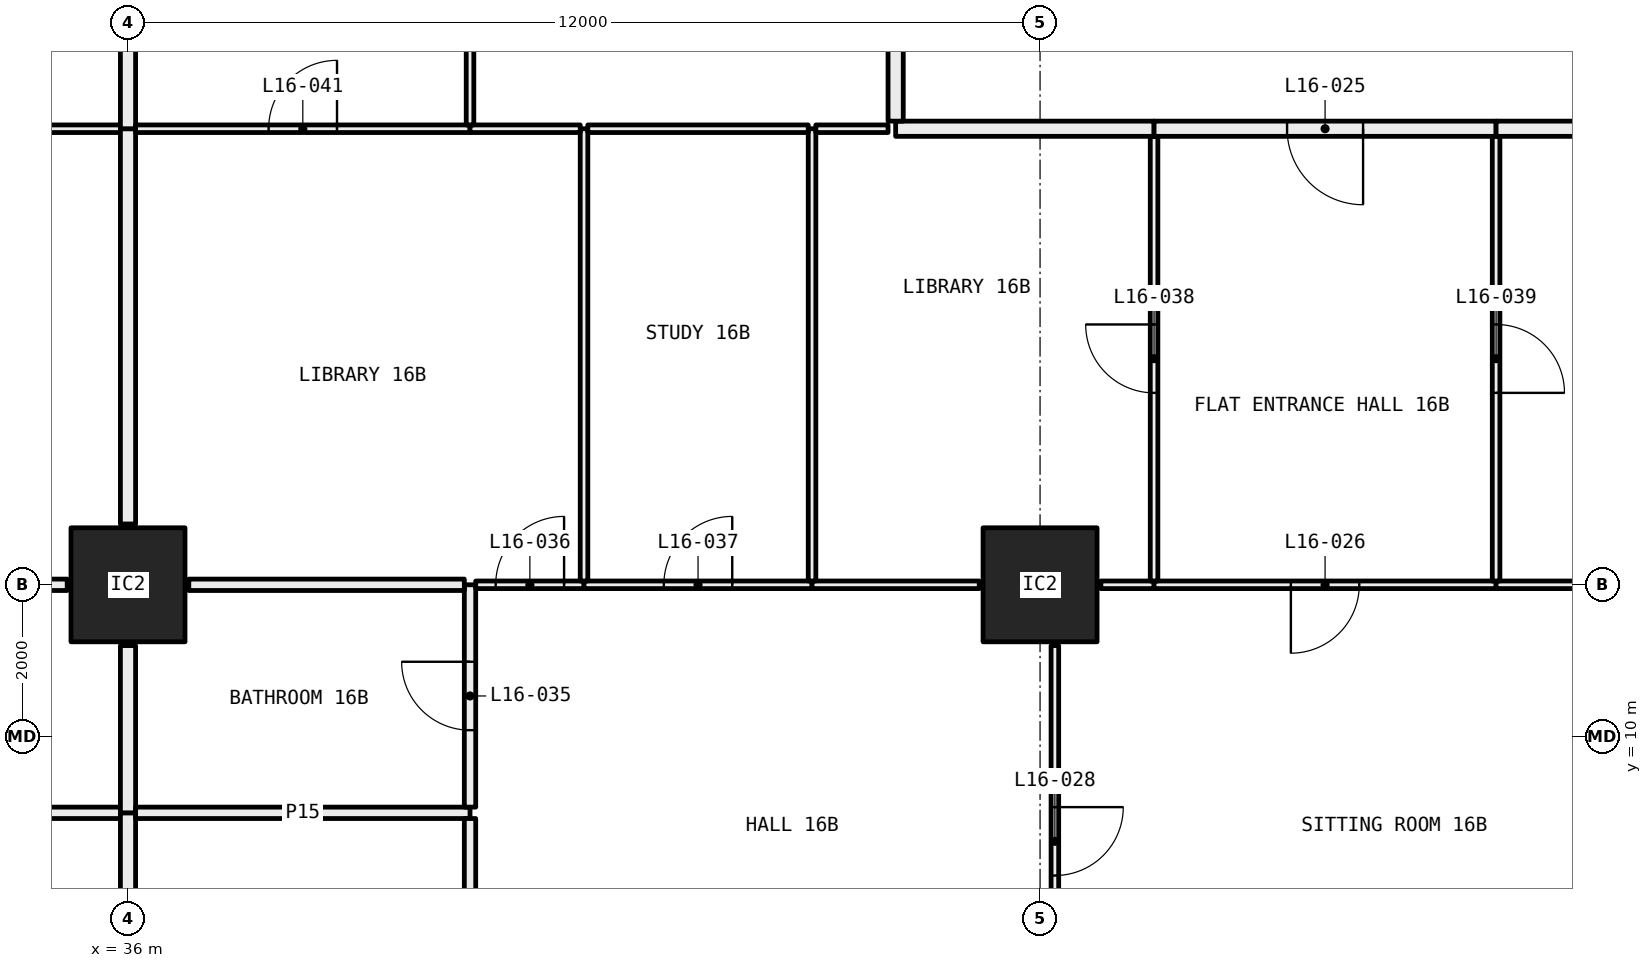
"""IFC4 building model, lengths in metres.
Left out: names, types, materials, properties, quantities, classifications, styles, units other than length and angle.
Written with IfcOpenShell. Run it as: python <this file> out.ifc"""

import sys

from ifc_helpers import new_model, si_unit, direction, frame, frame_2d, origin, origin_2d, place, context, subcontext, project, spatial, rectangle, hollow_rectangle, extrude, element, fill, save


model = new_model("IFC4")
c1 = context("Model", 3, precision=1e-05, world=origin(), true_north=direction((0.0, 1.0)))
c2 = subcontext(c1, "Body", "Model", "MODEL_VIEW")
j1 = project(units=[si_unit("LENGTHUNIT", "METRE"), si_unit("PLANEANGLEUNIT", "RADIAN")], contexts=[c1])
p1 = place(None, origin())
s1 = spatial("IfcSite", under=j1, at=p1, CompositionType="ELEMENT")
p2 = place(p1, origin())
s2 = spatial("IfcBuilding", under=s1, at=p2, CompositionType="ELEMENT")
p3 = place(p2, frame((0.0, 0.0, 67.95)))
s3 = spatial("IfcBuildingStorey", under=s2, at=p3, CompositionType="ELEMENT", Elevation=67.95)
for number, where, z_axis, x_axis in (
    (1, (36.0, 12.0, 0.0), (0.0, 0.0, 1.0), (1.0, 0.0, 0.0)),
    (2, (48.0, 12.0, 0.0), (0.0, 0.0, 1.0), (1.0, 0.0, 0.0)),
):
    element("IfcColumn", number, at=place(p3, frame(where, z_axis=z_axis, x_axis=x_axis)), inside=s3, PredefinedType="COLUMN", context=c2, shape_type="SweptSolid", body=[
        extrude(hollow_rectangle(XDim=1.5, YDim=1.5, WallThickness=0.065, at=origin_2d()), origin(), (0.0, 0.0, 1.0), 3.05),
    ])
p4 = place(p3, frame((35.9, 9.0, 0.0), z_axis=(0.0, 0.0, 1.0), x_axis=(-1.0, 0.0, 0.0)))
e3 = element("IfcWall", 3, at=p4, inside=s3, PredefinedType="PARTITIONING", context=c2, shape_type="SweptSolid", body=[
    extrude(rectangle(XDim=4.325, YDim=0.15, at=frame_2d((2.163, 0.0))), origin(), (0.0, 0.0, 1.0), 3.05),
])
p5 = place(p3, frame((36.0, 6.0, 0.0), z_axis=(0.0, 0.0, 1.0), x_axis=(0.0, 1.0, 0.0)))
e4 = element("IfcWall", 4, at=p5, inside=s3, PredefinedType="PARTITIONING", context=c2, shape_type="SweptSolid", body=[
    extrude(rectangle(XDim=3.0, YDim=0.2, at=frame_2d((1.5, 0.0))), origin(), (0.0, 0.0, 1.0), 2.45),
])
p6 = place(p3, frame((35.2, 12.0, 0.0), z_axis=(0.0, 0.0, 1.0), x_axis=(-1.0, 0.0, 0.0)))
e5 = element("IfcWall", 5, at=p6, inside=s3, PredefinedType="PARTITIONING", context=c2, shape_type="SweptSolid", body=[
    extrude(rectangle(XDim=3.625, YDim=0.15, at=frame_2d((1.812, 0.0))), origin(), (0.0, 0.0, 1.0), 2.45),
])
p7 = place(p3, frame((36.0, 9.0, 0.0), z_axis=(0.0, 0.0, 1.0), x_axis=(0.0, 1.0, 0.0)))
e6 = element("IfcWall", 6, at=p7, inside=s3, PredefinedType="PARTITIONING", context=c2, shape_type="SweptSolid", body=[
    extrude(rectangle(XDim=2.2, YDim=0.2, at=frame_2d((1.1, 0.0))), origin(), (0.0, 0.0, 1.0), 2.45),
])
p8 = place(p3, frame((35.9, 18.0, 0.0), z_axis=(0.0, 0.0, 1.0), x_axis=(-1.0, 0.0, 0.0)))
e7 = element("IfcWall", 7, at=p8, inside=s3, PredefinedType="PARTITIONING", context=c2, shape_type="SweptSolid", body=[
    extrude(rectangle(XDim=4.4, YDim=0.1, at=frame_2d((2.2, 0.0))), origin(), (0.0, 0.0, 1.0), 3.05),
])
for number, where, z_axis, x_axis in (
    (8, (36.0, 12.8, 0.0), (0.0, 0.0, 1.0), (0.0, 1.0, 0.0)),
    (9, (36.0, 18.0, 0.0), (0.0, 0.0, 1.0), (0.0, 1.0, 0.0)),
):
    element("IfcWall", number, at=place(p3, frame(where, z_axis=z_axis, x_axis=x_axis)), inside=s3, PredefinedType="PARTITIONING", context=c2, shape_type="SweptSolid", body=[
        extrude(rectangle(XDim=5.2, YDim=0.2, at=frame_2d((2.6, 0.0))), origin(), (0.0, 0.0, 1.0), 2.45),
    ])
p9 = place(p3, frame((40.5, 9.0, 0.0), z_axis=(0.0, 0.0, 1.0), x_axis=(-1.0, 0.0, 0.0)))
e10 = element("IfcWall", 10, at=p9, inside=s3, PredefinedType="PARTITIONING", context=c2, shape_type="SweptSolid", body=[
    extrude(rectangle(XDim=4.4, YDim=0.15, at=frame_2d((2.2, 0.0))), origin(), (0.0, 0.0, 1.0), 3.05),
])
p10 = place(p3, frame((40.5, 6.075, 0.0), z_axis=(0.0, 0.0, 1.0), x_axis=(0.0, 1.0, 0.0)))
e11 = element("IfcWall", 11, at=p10, inside=s3, PredefinedType="PARTITIONING", context=c2, shape_type="SweptSolid", body=[
    extrude(rectangle(XDim=2.85, YDim=0.15, at=frame_2d((1.425, 0.0))), origin(), (0.0, 0.0, 1.0), 3.05),
])
p11 = place(p10, frame((0.975, 0.0, 0.0)))
e12 = element("IfcOpeningElement", 12, at=p11, cuts=e11, PredefinedType="OPENING", context=c2, shape_type="SweptSolid", body=[
    extrude(rectangle(XDim=0.9, YDim=2.1, at=frame_2d((0.45, 1.05))), frame((0.0, 0.085, 0.0), z_axis=(0.0, -1.0, 0.0), x_axis=(1.0, 0.0, 0.0)), (0.0, 0.0, 1.0), 0.17),
])
p12 = place(p3, frame((40.5, 9.075, 0.0), z_axis=(0.0, 0.0, 1.0), x_axis=(0.0, 1.0, 0.0)))
e13 = element("IfcWall", 13, at=p12, inside=s3, PredefinedType="PARTITIONING", context=c2, shape_type="SweptSolid", body=[
    extrude(rectangle(XDim=2.925, YDim=0.15, at=frame_2d((1.462, 0.0))), origin(), (0.0, 0.0, 1.0), 2.45),
])
p13 = place(p12, frame((1.012, 0.0, 0.0)))
e14 = element("IfcOpeningElement", 14, at=p13, cuts=e13, PredefinedType="OPENING", context=c2, shape_type="SweptSolid", body=[
    extrude(rectangle(XDim=0.9, YDim=2.1, at=frame_2d((0.45, 1.05))), frame((0.0, 0.085, 0.0), z_axis=(0.0, -1.0, 0.0), x_axis=(1.0, 0.0, 0.0)), (0.0, 0.0, 1.0), 0.17),
])
p14 = place(p3, frame((40.425, 12.0, 0.0), z_axis=(0.0, 0.0, 1.0), x_axis=(-1.0, 0.0, 0.0)))
e15 = element("IfcWall", 15, at=p14, inside=s3, PredefinedType="PARTITIONING", context=c2, shape_type="SweptSolid", body=[
    extrude(rectangle(XDim=3.625, YDim=0.15, at=frame_2d((1.812, 0.0))), origin(), (0.0, 0.0, 1.0), 2.45),
])
p15 = place(p3, frame((48.195, 6.05, 0.0), z_axis=(0.0, 0.0, 1.0), x_axis=(0.0, 1.0, 0.0)))
e16 = element("IfcWall", 16, at=p15, inside=s3, PredefinedType="PARTITIONING", context=c2, shape_type="SweptSolid", body=[
    extrude(rectangle(XDim=5.15, YDim=0.1, at=frame_2d((2.575, 0.0))), origin(), (0.0, 0.0, 1.0), 3.05),
])
p16 = place(p15, frame((2.125, 0.0, 0.0)))
e17 = element("IfcOpeningElement", 17, at=p16, cuts=e16, PredefinedType="OPENING", context=c2, shape_type="SweptSolid", body=[
    extrude(rectangle(XDim=0.9, YDim=2.1, at=frame_2d((0.45, 1.05))), frame((0.0, 0.06, 0.0), z_axis=(0.0, -1.0, 0.0), x_axis=(1.0, 0.0, 0.0)), (0.0, 0.0, 1.0), 0.12),
])
p17 = place(p3, frame((42.0, 12.0, 0.0), z_axis=(0.0, 0.0, 1.0), x_axis=(-1.0, 0.0, 0.0)))
e18 = element("IfcWall", 18, at=p17, inside=s3, PredefinedType="PARTITIONING", context=c2, shape_type="SweptSolid", body=[
    extrude(rectangle(XDim=1.425, YDim=0.1, at=frame_2d((0.712, 0.0))), origin(), (0.0, 0.0, 1.0), 2.45),
])
p18 = place(p17, frame((0.262, 0.0, 0.0)))
e19 = element("IfcOpeningElement", 19, at=p18, cuts=e18, PredefinedType="OPENING", context=c2, shape_type="SweptSolid", body=[
    extrude(rectangle(XDim=0.9, YDim=2.1, at=frame_2d((0.45, 1.05))), frame((0.0, 0.06, 0.0), z_axis=(0.0, -1.0, 0.0), x_axis=(1.0, 0.0, 0.0)), (0.0, 0.0, 1.0), 0.12),
])
p19 = place(p3, frame((45.0, 12.0, 0.0), z_axis=(0.0, 0.0, 1.0), x_axis=(-1.0, 0.0, 0.0)))
e20 = element("IfcWall", 20, at=p19, inside=s3, PredefinedType="PARTITIONING", context=c2, shape_type="SweptSolid", body=[
    extrude(rectangle(XDim=3.0, YDim=0.1, at=frame_2d((1.5, 0.0))), origin(), (0.0, 0.0, 1.0), 2.45),
])
p20 = place(p19, frame((1.05, 0.0, 0.0)))
e21 = element("IfcOpeningElement", 21, at=p20, cuts=e20, PredefinedType="OPENING", context=c2, shape_type="SweptSolid", body=[
    extrude(rectangle(XDim=0.9, YDim=2.1, at=frame_2d((0.45, 1.05))), frame((0.0, 0.06, 0.0), z_axis=(0.0, -1.0, 0.0), x_axis=(1.0, 0.0, 0.0)), (0.0, 0.0, 1.0), 0.12),
])
p21 = place(p3, frame((47.2, 12.0, 0.0), z_axis=(0.0, 0.0, 1.0), x_axis=(-1.0, 0.0, 0.0)))
e22 = element("IfcWall", 22, at=p21, inside=s3, PredefinedType="PARTITIONING", context=c2, shape_type="SweptSolid", body=[
    extrude(rectangle(XDim=2.2, YDim=0.1, at=frame_2d((1.1, 0.0))), origin(), (0.0, 0.0, 1.0), 2.45),
])
p22 = place(p3, frame((49.5, 12.0, 0.0), z_axis=(0.0, 0.0, 1.0), x_axis=(-1.0, 0.0, 0.0)))
e23 = element("IfcWall", 23, at=p22, inside=s3, PredefinedType="PARTITIONING", context=c2, shape_type="SweptSolid", body=[
    extrude(rectangle(XDim=0.7, YDim=0.1, at=frame_2d((0.35, 0.0))), origin(), (0.0, 0.0, 1.0), 2.45),
])
p23 = place(p3, frame((54.0, 12.0, 0.0), z_axis=(0.0, 0.0, 1.0), x_axis=(-1.0, 0.0, 0.0)))
e24 = element("IfcWall", 24, at=p23, inside=s3, PredefinedType="PARTITIONING", context=c2, shape_type="SweptSolid", body=[
    extrude(rectangle(XDim=4.5, YDim=0.1, at=frame_2d((2.25, 0.0))), origin(), (0.0, 0.0, 1.0), 2.45),
])
p24 = place(p23, frame((1.8, 0.0, 0.0)))
e25 = element("IfcOpeningElement", 25, at=p24, cuts=e24, PredefinedType="OPENING", context=c2, shape_type="SweptSolid", body=[
    extrude(rectangle(XDim=0.9, YDim=2.1, at=frame_2d((0.45, 1.05))), frame((0.0, 0.06, 0.0), z_axis=(0.0, -1.0, 0.0), x_axis=(1.0, 0.0, 0.0)), (0.0, 0.0, 1.0), 0.12),
])
p25 = place(p3, frame((55.84, 12.0, 0.0), z_axis=(0.0, 0.0, 1.0), x_axis=(-1.0, 0.0, 0.0)))
e26 = element("IfcWall", 26, at=p25, inside=s3, PredefinedType="PARTITIONING", context=c2, shape_type="SweptSolid", body=[
    extrude(rectangle(XDim=1.84, YDim=0.1, at=frame_2d((0.92, 0.0))), origin(), (0.0, 0.0, 1.0), 2.45),
])
p26 = place(p3, frame((42.0, 12.05, 0.0), z_axis=(0.0, 0.0, 1.0), x_axis=(0.0, 1.0, 0.0)))
e27 = element("IfcWall", 27, at=p26, inside=s3, PredefinedType="PARTITIONING", context=c2, shape_type="SweptSolid", body=[
    extrude(rectangle(XDim=5.95, YDim=0.1, at=frame_2d((2.975, 0.0))), origin(), (0.0, 0.0, 1.0), 2.45),
])
p27 = place(p3, frame((40.5, 18.0, 0.0), z_axis=(0.0, 0.0, 1.0), x_axis=(-1.0, 0.0, 0.0)))
e28 = element("IfcWall", 28, at=p27, inside=s3, PredefinedType="PARTITIONING", context=c2, shape_type="SweptSolid", body=[
    extrude(rectangle(XDim=4.4, YDim=0.1, at=frame_2d((2.2, 0.0))), origin(), (0.0, 0.0, 1.0), 3.05),
])
p28 = place(p27, frame((1.75, 0.0, 0.0)))
e29 = element("IfcOpeningElement", 29, at=p28, cuts=e28, PredefinedType="OPENING", context=c2, shape_type="SweptSolid", body=[
    extrude(rectangle(XDim=0.9, YDim=2.1, at=frame_2d((0.45, 1.05))), frame((0.0, 0.06, 0.0), z_axis=(0.0, -1.0, 0.0), x_axis=(1.0, 0.0, 0.0)), (0.0, 0.0, 1.0), 0.12),
])
p29 = place(p3, frame((41.95, 18.0, 0.0), z_axis=(0.0, 0.0, 1.0), x_axis=(-1.0, 0.0, 0.0)))
e30 = element("IfcWall", 30, at=p29, inside=s3, PredefinedType="PARTITIONING", context=c2, shape_type="SweptSolid", body=[
    extrude(rectangle(XDim=1.45, YDim=0.1, at=frame_2d((0.725, 0.0))), origin(), (0.0, 0.0, 1.0), 3.05),
])
p30 = place(p3, frame((45.0, 12.05, 0.0), z_axis=(0.0, 0.0, 1.0), x_axis=(0.0, 1.0, 0.0)))
e31 = element("IfcWall", 31, at=p30, inside=s3, PredefinedType="PARTITIONING", context=c2, shape_type="SweptSolid", body=[
    extrude(rectangle(XDim=5.95, YDim=0.1, at=frame_2d((2.975, 0.0))), origin(), (0.0, 0.0, 1.0), 2.45),
])
p31 = place(p3, frame((44.95, 18.0, 0.0), z_axis=(0.0, 0.0, 1.0), x_axis=(-1.0, 0.0, 0.0)))
e32 = element("IfcWall", 32, at=p31, inside=s3, PredefinedType="PARTITIONING", context=c2, shape_type="SweptSolid", body=[
    extrude(rectangle(XDim=2.9, YDim=0.1, at=frame_2d((1.45, 0.0))), origin(), (0.0, 0.0, 1.0), 3.05),
])
p32 = place(p3, frame((49.5, 12.05, 0.0), z_axis=(0.0, 0.0, 1.0), x_axis=(0.0, 1.0, 0.0)))
e33 = element("IfcWall", 33, at=p32, inside=s3, PredefinedType="PARTITIONING", context=c2, shape_type="SweptSolid", body=[
    extrude(rectangle(XDim=5.85, YDim=0.1, at=frame_2d((2.925, 0.0))), origin(), (0.0, 0.0, 1.0), 2.45),
])
p33 = place(p32, frame((2.475, 0.0, 0.0)))
e34 = element("IfcOpeningElement", 34, at=p33, cuts=e33, PredefinedType="OPENING", context=c2, shape_type="SweptSolid", body=[
    extrude(rectangle(XDim=0.9, YDim=2.1, at=frame_2d((0.45, 1.05))), frame((0.0, 0.06, 0.0), z_axis=(0.0, -1.0, 0.0), x_axis=(1.0, 0.0, 0.0)), (0.0, 0.0, 1.0), 0.12),
])
p34 = place(p3, frame((46.0, 18.0, 0.0), z_axis=(0.0, 0.0, 1.0), x_axis=(-1.0, 0.0, 0.0)))
e35 = element("IfcWall", 35, at=p34, inside=s3, PredefinedType="PARTITIONING", context=c2, shape_type="SweptSolid", body=[
    extrude(rectangle(XDim=0.95, YDim=0.1, at=frame_2d((0.475, 0.0))), origin(), (0.0, 0.0, 1.0), 3.05),
])
p35 = place(p3, frame((49.5, 18.0, 0.0), z_axis=(0.0, 0.0, 1.0), x_axis=(-1.0, 0.0, 0.0)))
e36 = element("IfcWall", 36, at=p35, inside=s3, PredefinedType="PARTITIONING", context=c2, shape_type="SweptSolid", body=[
    extrude(rectangle(XDim=3.4, YDim=0.2, at=frame_2d((1.7, 0.0))), origin(), (0.0, 0.0, 1.0), 3.05),
])
p36 = place(p3, frame((54.0, 12.05, 0.0), z_axis=(0.0, 0.0, 1.0), x_axis=(0.0, 1.0, 0.0)))
e37 = element("IfcWall", 37, at=p36, inside=s3, PredefinedType="PARTITIONING", context=c2, shape_type="SweptSolid", body=[
    extrude(rectangle(XDim=5.85, YDim=0.1, at=frame_2d((2.925, 0.0))), origin(), (0.0, 0.0, 1.0), 2.45),
])
p37 = place(p36, frame((2.475, 0.0, 0.0)))
e38 = element("IfcOpeningElement", 38, at=p37, cuts=e37, PredefinedType="OPENING", context=c2, shape_type="SweptSolid", body=[
    extrude(rectangle(XDim=0.9, YDim=2.1, at=frame_2d((0.45, 1.05))), frame((0.0, 0.06, 0.0), z_axis=(0.0, -1.0, 0.0), x_axis=(1.0, 0.0, 0.0)), (0.0, 0.0, 1.0), 0.12),
])
p38 = place(p3, frame((54.0, 18.0, 0.0), z_axis=(0.0, 0.0, 1.0), x_axis=(-1.0, 0.0, 0.0)))
e39 = element("IfcWall", 39, at=p38, inside=s3, PredefinedType="PARTITIONING", context=c2, shape_type="SweptSolid", body=[
    extrude(rectangle(XDim=4.5, YDim=0.2, at=frame_2d((2.25, 0.0))), origin(), (0.0, 0.0, 1.0), 3.05),
])
p39 = place(p38, frame((1.75, 0.0, 0.0)))
e40 = element("IfcOpeningElement", 40, at=p39, cuts=e39, PredefinedType="OPENING", context=c2, shape_type="SweptSolid", body=[
    extrude(rectangle(XDim=1.0, YDim=2.1, at=frame_2d((0.5, 1.05))), frame((0.0, 0.11, 0.0), z_axis=(0.0, -1.0, 0.0), x_axis=(1.0, 0.0, 0.0)), (0.0, 0.0, 1.0), 0.22),
])
p40 = place(p3, frame((61.9, 18.0, 0.0), z_axis=(0.0, 0.0, 1.0), x_axis=(-1.0, 0.0, 0.0)))
e41 = element("IfcWall", 41, at=p40, inside=s3, PredefinedType="PARTITIONING", context=c2, shape_type="SweptSolid", body=[
    extrude(rectangle(XDim=7.9, YDim=0.2, at=frame_2d((3.95, 0.0))), origin(), (0.0, 0.0, 1.0), 3.05),
])
p41 = place(p3, frame((40.5, 18.05, 0.0), z_axis=(0.0, 0.0, 1.0), x_axis=(0.0, 1.0, 0.0)))
e42 = element("IfcWall", 42, at=p41, inside=s3, PredefinedType="PARTITIONING", context=c2, shape_type="SweptSolid", body=[
    extrude(rectangle(XDim=6.175, YDim=0.1, at=frame_2d((3.087, 0.0))), origin(), (0.0, 0.0, 1.0), 2.45),
])
p42 = place(p41, frame((2.637, 0.0, 0.0)))
e43 = element("IfcOpeningElement", 43, at=p42, cuts=e42, PredefinedType="OPENING", context=c2, shape_type="SweptSolid", body=[
    extrude(rectangle(XDim=0.9, YDim=2.1, at=frame_2d((0.45, 1.05))), frame((0.0, 0.06, 0.0), z_axis=(0.0, -1.0, 0.0), x_axis=(1.0, 0.0, 0.0)), (0.0, 0.0, 1.0), 0.12),
])
p43 = place(p3, frame((46.1, 18.1, 0.0), z_axis=(0.0, 0.0, 1.0), x_axis=(0.0, 1.0, 0.0)))
e44 = element("IfcWall", 44, at=p43, inside=s3, PredefinedType="PARTITIONING", context=c2, shape_type="SweptSolid", body=[
    extrude(rectangle(XDim=6.2, YDim=0.2, at=frame_2d((3.1, 0.0))), origin(), (0.0, 0.0, 1.0), 2.45),
])
p44 = place(p39, origin())
e45 = element("IfcDoor", 45, at=p44, inside=s3, OperationType="SINGLE_SWING_RIGHT", PredefinedType="DOOR", context=c2, shape_type="SweptSolid", body=[
    extrude(rectangle(XDim=1.0, YDim=2.1, at=frame_2d((0.5, 1.05))), frame((0.0, 0.025, 0.0), z_axis=(0.0, -1.0, 0.0), x_axis=(1.0, 0.0, 0.0)), (0.0, 0.0, 1.0), 0.05),
])
fill(e40, e45)
p45 = place(p24, origin())
e46 = element("IfcDoor", 46, at=p45, inside=s3, OperationType="SINGLE_SWING_LEFT", PredefinedType="DOOR", context=c2, shape_type="SweptSolid", body=[
    extrude(rectangle(XDim=0.9, YDim=2.1, at=frame_2d((0.45, 1.05))), frame((0.0, 0.025, 0.0), z_axis=(0.0, -1.0, 0.0), x_axis=(1.0, 0.0, 0.0)), (0.0, 0.0, 1.0), 0.05),
])
fill(e25, e46)
p46 = place(p16, frame((0.9, 0.0, 0.0), x_axis=(-1.0, 0.0, 0.0)))
e47 = element("IfcDoor", 47, at=p46, inside=s3, OperationType="SINGLE_SWING_RIGHT", PredefinedType="DOOR", context=c2, shape_type="SweptSolid", body=[
    extrude(rectangle(XDim=0.9, YDim=2.1, at=frame_2d((0.45, 1.05))), frame((0.0, 0.025, 0.0), z_axis=(0.0, -1.0, 0.0), x_axis=(1.0, 0.0, 0.0)), (0.0, 0.0, 1.0), 0.05),
])
fill(e17, e47)
p47 = place(p13, origin())
e48 = element("IfcDoor", 48, at=p47, inside=s3, OperationType="SINGLE_SWING_LEFT", PredefinedType="DOOR", context=c2, shape_type="SweptSolid", body=[
    extrude(rectangle(XDim=0.9, YDim=2.1, at=frame_2d((0.45, 1.05))), frame((0.0, 0.025, 0.0), z_axis=(0.0, -1.0, 0.0), x_axis=(1.0, 0.0, 0.0)), (0.0, 0.0, 1.0), 0.05),
])
fill(e14, e48)
p48 = place(p18, frame((0.9, 0.0, 0.0), x_axis=(-1.0, 0.0, 0.0)))
e49 = element("IfcDoor", 49, at=p48, inside=s3, OperationType="SINGLE_SWING_LEFT", PredefinedType="DOOR", context=c2, shape_type="SweptSolid", body=[
    extrude(rectangle(XDim=0.9, YDim=2.1, at=frame_2d((0.45, 1.05))), frame((0.0, 0.025, 0.0), z_axis=(0.0, -1.0, 0.0), x_axis=(1.0, 0.0, 0.0)), (0.0, 0.0, 1.0), 0.05),
])
fill(e19, e49)
p49 = place(p20, frame((0.9, 0.0, 0.0), x_axis=(-1.0, 0.0, 0.0)))
e50 = element("IfcDoor", 50, at=p49, inside=s3, OperationType="SINGLE_SWING_LEFT", PredefinedType="DOOR", context=c2, shape_type="SweptSolid", body=[
    extrude(rectangle(XDim=0.9, YDim=2.1, at=frame_2d((0.45, 1.05))), frame((0.0, 0.025, 0.0), z_axis=(0.0, -1.0, 0.0), x_axis=(1.0, 0.0, 0.0)), (0.0, 0.0, 1.0), 0.05),
])
fill(e21, e50)
p50 = place(p33, origin())
e51 = element("IfcDoor", 51, at=p50, inside=s3, OperationType="SINGLE_SWING_LEFT", PredefinedType="DOOR", context=c2, shape_type="SweptSolid", body=[
    extrude(rectangle(XDim=0.9, YDim=2.1, at=frame_2d((0.45, 1.05))), frame((0.0, 0.025, 0.0), z_axis=(0.0, -1.0, 0.0), x_axis=(1.0, 0.0, 0.0)), (0.0, 0.0, 1.0), 0.05),
])
fill(e34, e51)
p51 = place(p37, frame((0.9, 0.0, 0.0), x_axis=(-1.0, 0.0, 0.0)))
e52 = element("IfcDoor", 52, at=p51, inside=s3, OperationType="SINGLE_SWING_LEFT", PredefinedType="DOOR", context=c2, shape_type="SweptSolid", body=[
    extrude(rectangle(XDim=0.9, YDim=2.1, at=frame_2d((0.45, 1.05))), frame((0.0, 0.025, 0.0), z_axis=(0.0, -1.0, 0.0), x_axis=(1.0, 0.0, 0.0)), (0.0, 0.0, 1.0), 0.05),
])
fill(e38, e52)
p52 = place(p28, frame((0.9, 0.0, 0.0), x_axis=(-1.0, 0.0, 0.0)))
e53 = element("IfcDoor", 53, at=p52, inside=s3, OperationType="SINGLE_SWING_LEFT", PredefinedType="DOOR", context=c2, shape_type="SweptSolid", body=[
    extrude(rectangle(XDim=0.9, YDim=2.1, at=frame_2d((0.45, 1.05))), frame((0.0, 0.025, 0.0), z_axis=(0.0, -1.0, 0.0), x_axis=(1.0, 0.0, 0.0)), (0.0, 0.0, 1.0), 0.05),
])
fill(e29, e53)
save(model, sys.argv[1])
